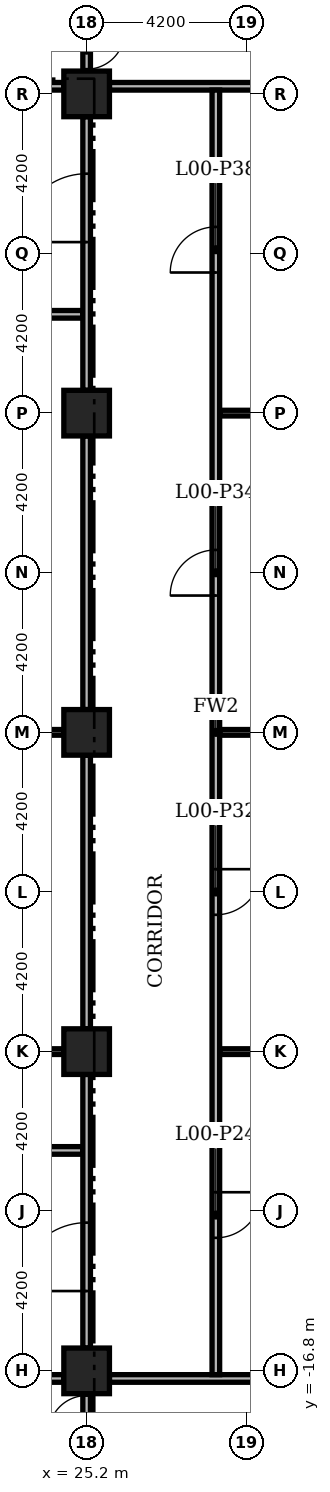
"""IFC4 building model, lengths in metres.
Left out: names, types, materials, properties, quantities, classifications, styles, units other than length and angle.
Written with IfcOpenShell. Run it as: python <this file> out.ifc"""

import sys

from ifc_helpers import new_model, si_unit, direction, frame, frame_2d, origin, origin_2d, place, context, subcontext, project, spatial, rectangle, extrude, element, fill, save


model = new_model("IFC4")
c1 = context("Model", 3, precision=1e-05, world=origin(), true_north=direction((0.0, 1.0)))
c2 = subcontext(c1, "Body", "Model", "MODEL_VIEW")
j1 = project(units=[si_unit("LENGTHUNIT", "METRE"), si_unit("PLANEANGLEUNIT", "RADIAN")], contexts=[c1])
p1 = place(None, origin())
s1 = spatial("IfcSite", under=j1, at=p1, CompositionType="ELEMENT")
p2 = place(p1, origin())
s2 = spatial("IfcBuilding", under=s1, at=p2, CompositionType="ELEMENT")
p3 = place(p2, origin())
s3 = spatial("IfcBuildingStorey", under=s2, at=p3, CompositionType="ELEMENT", Elevation=0.0)
for number, where, z_axis, x_axis in (
    (1, (25.2, 0.0, 0.0), (0.0, 0.0, 1.0), (1.0, 0.0, 0.0)),
    (2, (25.2, 8.4, 0.0), (0.0, 0.0, 1.0), (1.0, 0.0, 0.0)),
    (3, (25.2, 16.8, 0.0), (0.0, 0.0, 1.0), (1.0, 0.0, 0.0)),
    (4, (25.2, -8.4, 0.0), (0.0, 0.0, 1.0), (1.0, 0.0, 0.0)),
    (5, (25.2, -16.8, 0.0), (0.0, 0.0, 1.0), (1.0, 0.0, 0.0)),
):
    element("IfcColumn", number, at=place(p3, frame(where, z_axis=z_axis, x_axis=x_axis)), inside=s3, PredefinedType="COLUMN", context=c2, shape_type="SweptSolid", body=[
        extrude(rectangle(XDim=1.2, YDim=1.2, at=origin_2d()), origin(), (0.0, 0.0, 1.0), 7.2),
    ])
p4 = place(p3, frame((21.85, -17.0, 0.0), z_axis=(0.0, 0.0, 1.0), x_axis=(1.0, 0.0, 0.0)))
e6 = element("IfcWall", 6, at=p4, inside=s3, PredefinedType="PARTITIONING", context=c2, shape_type="SweptSolid", body=[
    extrude(rectangle(XDim=2.75, YDim=0.2, at=frame_2d((1.375, 0.0))), origin(), (0.0, 0.0, 1.0), 6.78),
])
p5 = place(p3, frame((25.8, -17.0, 0.0), z_axis=(0.0, 0.0, 1.0), x_axis=(1.0, 0.0, 0.0)))
e7 = element("IfcWall", 7, at=p5, inside=s3, PredefinedType="PARTITIONING", context=c2, shape_type="SweptSolid", body=[
    extrude(rectangle(XDim=7.2, YDim=0.2, at=frame_2d((3.6, 0.0))), origin(), (0.0, 0.0, 1.0), 6.48),
])
p6 = place(p3, frame((11.0, -11.0, 0.0), z_axis=(0.0, 0.0, 1.0), x_axis=(1.0, 0.0, 0.0)))
e8 = element("IfcWall", 8, at=p6, inside=s3, PredefinedType="PARTITIONING", context=c2, shape_type="SweptSolid", body=[
    extrude(rectangle(XDim=14.1, YDim=0.2, at=frame_2d((7.05, 0.0))), origin(), (0.0, 0.0, 1.0), 6.78),
])
p7 = place(p6, frame((6.5, 0.0, 0.0)))
e9 = element("IfcOpeningElement", 9, at=p7, cuts=e8, PredefinedType="OPENING", context=c2, shape_type="SweptSolid", body=[
    extrude(rectangle(XDim=1.2, YDim=2.2, at=frame_2d((0.6, 1.1))), frame((0.0, 0.11, 0.0), z_axis=(0.0, -1.0, 0.0), x_axis=(1.0, 0.0, 0.0)), (0.0, 0.0, 1.0), 0.22),
])
p8 = place(p3, frame((11.0, -8.4, 0.0), z_axis=(0.0, 0.0, 1.0), x_axis=(1.0, 0.0, 0.0)))
e10 = element("IfcWall", 10, at=p8, inside=s3, PredefinedType="PARTITIONING", context=c2, shape_type="SweptSolid", body=[
    extrude(rectangle(XDim=13.6, YDim=0.15, at=frame_2d((6.8, 0.0))), origin(), (0.0, 0.0, 1.0), 6.78),
])
p9 = place(p8, frame((0.5, 0.0, 0.0)))
e11 = element("IfcOpeningElement", 11, at=p9, cuts=e10, PredefinedType="OPENING", context=c2, shape_type="SweptSolid", body=[
    extrude(rectangle(XDim=1.0, YDim=2.1, at=frame_2d((0.5, 1.05))), frame((0.0, 0.085, 0.0), z_axis=(0.0, -1.0, 0.0), x_axis=(1.0, 0.0, 0.0)), (0.0, 0.0, 1.0), 0.17),
])
p10 = place(p8, frame((3.7, 0.0, 0.0)))
e12 = element("IfcOpeningElement", 12, at=p10, cuts=e10, PredefinedType="OPENING", context=c2, shape_type="SweptSolid", body=[
    extrude(rectangle(XDim=1.0, YDim=2.1, at=frame_2d((0.5, 1.05))), frame((0.0, 0.085, 0.0), z_axis=(0.0, -1.0, 0.0), x_axis=(1.0, 0.0, 0.0)), (0.0, 0.0, 1.0), 0.17),
])
p11 = place(p8, frame((8.1, 0.0, 0.0)))
e13 = element("IfcOpeningElement", 13, at=p11, cuts=e10, PredefinedType="OPENING", context=c2, shape_type="SweptSolid", body=[
    extrude(rectangle(XDim=1.0, YDim=2.1, at=frame_2d((0.5, 1.05))), frame((0.0, 0.085, 0.0), z_axis=(0.0, -1.0, 0.0), x_axis=(1.0, 0.0, 0.0)), (0.0, 0.0, 1.0), 0.17),
])
p12 = place(p8, frame((11.3, 0.0, 0.0)))
e14 = element("IfcOpeningElement", 14, at=p12, cuts=e10, PredefinedType="OPENING", context=c2, shape_type="SweptSolid", body=[
    extrude(rectangle(XDim=1.0, YDim=2.1, at=frame_2d((0.5, 1.05))), frame((0.0, 0.085, 0.0), z_axis=(0.0, -1.0, 0.0), x_axis=(1.0, 0.0, 0.0)), (0.0, 0.0, 1.0), 0.17),
])
p13 = place(p3, frame((28.7, -8.4, 0.0), z_axis=(0.0, 0.0, 1.0), x_axis=(1.0, 0.0, 0.0)))
e15 = element("IfcWall", 15, at=p13, inside=s3, PredefinedType="PARTITIONING", context=c2, shape_type="SweptSolid", body=[
    extrude(rectangle(XDim=4.3, YDim=0.15, at=frame_2d((2.15, 0.0))), origin(), (0.0, 0.0, 1.0), 6.48),
])
p14 = place(p3, frame((11.0, 0.0, 0.0), z_axis=(0.0, 0.0, 1.0), x_axis=(1.0, 0.0, 0.0)))
e16 = element("IfcWall", 16, at=p14, inside=s3, PredefinedType="PARTITIONING", context=c2, shape_type="SweptSolid", body=[
    extrude(rectangle(XDim=13.6, YDim=0.15, at=frame_2d((6.8, 0.0))), origin(), (0.0, 0.0, 1.0), 6.78),
])
for number, where, z_axis, x_axis in (
    (17, (28.7, 0.0, 0.0), (0.0, 0.0, 1.0), (1.0, 0.0, 0.0)),
    (18, (28.7, 8.4, 0.0), (0.0, 0.0, 1.0), (1.0, 0.0, 0.0)),
):
    element("IfcWall", number, at=place(p3, frame(where, z_axis=z_axis, x_axis=x_axis)), inside=s3, PredefinedType="PARTITIONING", context=c2, shape_type="SweptSolid", body=[
        extrude(rectangle(XDim=4.3, YDim=0.15, at=frame_2d((2.15, 0.0))), origin(), (0.0, 0.0, 1.0), 6.48),
    ])
p15 = place(p3, frame((11.0, 11.0, 0.0), z_axis=(0.0, 0.0, 1.0), x_axis=(1.0, 0.0, 0.0)))
e19 = element("IfcWall", 19, at=p15, inside=s3, PredefinedType="PARTITIONING", context=c2, shape_type="SweptSolid", body=[
    extrude(rectangle(XDim=14.1, YDim=0.2, at=frame_2d((7.05, 0.0))), origin(), (0.0, 0.0, 1.0), 6.78),
])
p16 = place(p15, frame((6.4, 0.0, 0.0)))
e20 = element("IfcOpeningElement", 20, at=p16, cuts=e19, PredefinedType="OPENING", context=c2, shape_type="SweptSolid", body=[
    extrude(rectangle(XDim=1.2, YDim=2.2, at=frame_2d((0.6, 1.1))), frame((0.0, 0.11, 0.0), z_axis=(0.0, -1.0, 0.0), x_axis=(1.0, 0.0, 0.0)), (0.0, 0.0, 1.0), 0.22),
])
p17 = place(p3, frame((21.85, 17.0, 0.0), z_axis=(0.0, 0.0, 1.0), x_axis=(1.0, 0.0, 0.0)))
e21 = element("IfcWall", 21, at=p17, inside=s3, PredefinedType="PARTITIONING", context=c2, shape_type="SweptSolid", body=[
    extrude(rectangle(XDim=2.75, YDim=0.2, at=frame_2d((1.375, 0.0))), origin(), (0.0, 0.0, 1.0), 6.78),
])
p18 = place(p3, frame((25.8, 17.0, 0.0), z_axis=(0.0, 0.0, 1.0), x_axis=(1.0, 0.0, 0.0)))
e22 = element("IfcWall", 22, at=p18, inside=s3, PredefinedType="PARTITIONING", context=c2, shape_type="SweptSolid", body=[
    extrude(rectangle(XDim=7.2, YDim=0.2, at=frame_2d((3.6, 0.0))), origin(), (0.0, 0.0, 1.0), 6.48),
])
p19 = place(p3, frame((25.2, -18.5, 0.0), z_axis=(0.0, 0.0, 1.0), x_axis=(0.0, 1.0, 0.0)))
e23 = element("IfcWall", 23, at=p19, inside=s3, PredefinedType="PARTITIONING", context=c2, shape_type="SweptSolid", body=[
    extrude(rectangle(XDim=1.1, YDim=0.2, at=frame_2d((0.55, 0.0))), origin(), (0.0, 0.0, 1.0), 6.38),
])
p20 = place(p19, frame((0.05, 0.0, 0.0)))
e24 = element("IfcOpeningElement", 24, at=p20, cuts=e23, PredefinedType="OPENING", context=c2, shape_type="SweptSolid", body=[
    extrude(rectangle(XDim=1.0, YDim=2.2, at=frame_2d((0.5, 1.1))), frame((0.0, 0.11, 0.0), z_axis=(0.0, -1.0, 0.0), x_axis=(1.0, 0.0, 0.0)), (0.0, 0.0, 1.0), 0.22),
])
p21 = place(p3, frame((25.2, -16.2, 0.0), z_axis=(0.0, 0.0, 1.0), x_axis=(0.0, 1.0, 0.0)))
e25 = element("IfcWall", 25, at=p21, inside=s3, PredefinedType="PARTITIONING", context=c2, shape_type="SweptSolid", body=[
    extrude(rectangle(XDim=7.2, YDim=0.2, at=frame_2d((3.6, 0.0))), origin(), (0.0, 0.0, 1.0), 6.48),
])
p22 = place(p21, frame((1.5, 0.0, 0.0)))
e26 = element("IfcOpeningElement", 26, at=p22, cuts=e25, PredefinedType="OPENING", context=c2, shape_type="SweptSolid", body=[
    extrude(rectangle(XDim=1.8, YDim=2.2, at=frame_2d((0.9, 1.1))), frame((0.0, 0.11, 0.0), z_axis=(0.0, -1.0, 0.0), x_axis=(1.0, 0.0, 0.0)), (0.0, 0.0, 1.0), 0.22),
])
for number, where, z_axis, x_axis in (
    (27, (25.2, -7.8, 0.0), (0.0, 0.0, 1.0), (0.0, 1.0, 0.0)),
    (28, (25.2, 0.6, 0.0), (0.0, 0.0, 1.0), (0.0, 1.0, 0.0)),
):
    element("IfcWall", number, at=place(p3, frame(where, z_axis=z_axis, x_axis=x_axis)), inside=s3, PredefinedType="PARTITIONING", context=c2, shape_type="SweptSolid", body=[
        extrude(rectangle(XDim=7.2, YDim=0.2, at=frame_2d((3.6, 0.0))), origin(), (0.0, 0.0, 1.0), 6.48),
    ])
p23 = place(p3, frame((25.2, 9.0, 0.0), z_axis=(0.0, 0.0, 1.0), x_axis=(0.0, 1.0, 0.0)))
e29 = element("IfcWall", 29, at=p23, inside=s3, PredefinedType="PARTITIONING", context=c2, shape_type="SweptSolid", body=[
    extrude(rectangle(XDim=7.2, YDim=0.2, at=frame_2d((3.6, 0.0))), origin(), (0.0, 0.0, 1.0), 6.48),
])
p24 = place(p23, frame((3.9, 0.0, 0.0)))
e30 = element("IfcOpeningElement", 30, at=p24, cuts=e29, PredefinedType="OPENING", context=c2, shape_type="SweptSolid", body=[
    extrude(rectangle(XDim=1.8, YDim=2.2, at=frame_2d((0.9, 1.1))), frame((0.0, 0.11, 0.0), z_axis=(0.0, -1.0, 0.0), x_axis=(1.0, 0.0, 0.0)), (0.0, 0.0, 1.0), 0.22),
])
p25 = place(p3, frame((25.2, 17.4, 0.0), z_axis=(0.0, 0.0, 1.0), x_axis=(0.0, 1.0, 0.0)))
e31 = element("IfcWall", 31, at=p25, inside=s3, PredefinedType="PARTITIONING", context=c2, shape_type="SweptSolid", body=[
    extrude(rectangle(XDim=1.1, YDim=0.2, at=frame_2d((0.55, 0.0))), origin(), (0.0, 0.0, 1.0), 6.38),
])
p26 = place(p25, frame((0.05, 0.0, 0.0)))
e32 = element("IfcOpeningElement", 32, at=p26, cuts=e31, PredefinedType="OPENING", context=c2, shape_type="SweptSolid", body=[
    extrude(rectangle(XDim=1.0, YDim=2.2, at=frame_2d((0.5, 1.1))), frame((0.0, 0.11, 0.0), z_axis=(0.0, -1.0, 0.0), x_axis=(1.0, 0.0, 0.0)), (0.0, 0.0, 1.0), 0.22),
])
p27 = place(p3, frame((28.6, -16.9, 0.0), z_axis=(0.0, 0.0, 1.0), x_axis=(0.0, 1.0, 0.0)))
e33 = element("IfcWall", 33, at=p27, inside=s3, PredefinedType="PARTITIONING", context=c2, shape_type="SweptSolid", body=[
    extrude(rectangle(XDim=33.8, YDim=0.2, at=frame_2d((16.9, 0.0))), origin(), (0.0, 0.0, 1.0), 6.48),
])
p28 = place(p27, frame((3.6, 0.0, 0.0)))
e34 = element("IfcOpeningElement", 34, at=p28, cuts=e33, PredefinedType="OPENING", context=c2, shape_type="SweptSolid", body=[
    extrude(rectangle(XDim=1.2, YDim=2.2, at=frame_2d((0.6, 1.1))), frame((0.0, 0.11, 0.0), z_axis=(0.0, -1.0, 0.0), x_axis=(1.0, 0.0, 0.0)), (0.0, 0.0, 1.0), 0.22),
])
p29 = place(p27, frame((12.1, 0.0, 0.0)))
e35 = element("IfcOpeningElement", 35, at=p29, cuts=e33, PredefinedType="OPENING", context=c2, shape_type="SweptSolid", body=[
    extrude(rectangle(XDim=1.2, YDim=2.2, at=frame_2d((0.6, 1.1))), frame((0.0, 0.11, 0.0), z_axis=(0.0, -1.0, 0.0), x_axis=(1.0, 0.0, 0.0)), (0.0, 0.0, 1.0), 0.22),
])
p30 = place(p27, frame((20.5, 0.0, 0.0)))
e36 = element("IfcOpeningElement", 36, at=p30, cuts=e33, PredefinedType="OPENING", context=c2, shape_type="SweptSolid", body=[
    extrude(rectangle(XDim=1.2, YDim=2.2, at=frame_2d((0.6, 1.1))), frame((0.0, 0.11, 0.0), z_axis=(0.0, -1.0, 0.0), x_axis=(1.0, 0.0, 0.0)), (0.0, 0.0, 1.0), 0.22),
])
p31 = place(p27, frame((29.0, 0.0, 0.0)))
e37 = element("IfcOpeningElement", 37, at=p31, cuts=e33, PredefinedType="OPENING", context=c2, shape_type="SweptSolid", body=[
    extrude(rectangle(XDim=1.2, YDim=2.2, at=frame_2d((0.6, 1.1))), frame((0.0, 0.11, 0.0), z_axis=(0.0, -1.0, 0.0), x_axis=(1.0, 0.0, 0.0)), (0.0, 0.0, 1.0), 0.22),
])
p32 = place(p20, origin())
e38 = element("IfcDoor", 38, at=p32, inside=s3, OperationType="SINGLE_SWING_LEFT", PredefinedType="DOOR", context=c2, shape_type="SweptSolid", body=[
    extrude(rectangle(XDim=1.0, YDim=2.2, at=frame_2d((0.5, 1.1))), frame((0.0, 0.025, 0.0), z_axis=(0.0, -1.0, 0.0), x_axis=(1.0, 0.0, 0.0)), (0.0, 0.0, 1.0), 0.05),
])
fill(e24, e38)
p33 = place(p22, origin())
e39 = element("IfcDoor", 39, at=p33, inside=s3, OperationType="DOUBLE_DOOR_SINGLE_SWING", PredefinedType="DOOR", context=c2, shape_type="SweptSolid", body=[
    extrude(rectangle(XDim=1.8, YDim=2.2, at=frame_2d((0.9, 1.1))), frame((0.0, 0.025, 0.0), z_axis=(0.0, -1.0, 0.0), x_axis=(1.0, 0.0, 0.0)), (0.0, 0.0, 1.0), 0.05),
])
fill(e26, e39)
p34 = place(p28, origin())
e40 = element("IfcDoor", 40, at=p34, inside=s3, OperationType="SINGLE_SWING_RIGHT", PredefinedType="DOOR", context=c2, shape_type="SweptSolid", body=[
    extrude(rectangle(XDim=1.2, YDim=2.2, at=frame_2d((0.6, 1.1))), frame((0.0, 0.025, 0.0), z_axis=(0.0, -1.0, 0.0), x_axis=(1.0, 0.0, 0.0)), (0.0, 0.0, 1.0), 0.05),
])
fill(e34, e40)
p35 = place(p29, origin())
e41 = element("IfcDoor", 41, at=p35, inside=s3, OperationType="SINGLE_SWING_RIGHT", PredefinedType="DOOR", context=c2, shape_type="SweptSolid", body=[
    extrude(rectangle(XDim=1.2, YDim=2.2, at=frame_2d((0.6, 1.1))), frame((0.0, 0.025, 0.0), z_axis=(0.0, -1.0, 0.0), x_axis=(1.0, 0.0, 0.0)), (0.0, 0.0, 1.0), 0.05),
])
fill(e35, e41)
p36 = place(p30, origin())
e42 = element("IfcDoor", 42, at=p36, inside=s3, OperationType="SINGLE_SWING_LEFT", PredefinedType="DOOR", context=c2, shape_type="SweptSolid", body=[
    extrude(rectangle(XDim=1.2, YDim=2.2, at=frame_2d((0.6, 1.1))), frame((0.0, 0.025, 0.0), z_axis=(0.0, -1.0, 0.0), x_axis=(1.0, 0.0, 0.0)), (0.0, 0.0, 1.0), 0.05),
])
fill(e36, e42)
p37 = place(p31, origin())
e43 = element("IfcDoor", 43, at=p37, inside=s3, OperationType="SINGLE_SWING_LEFT", PredefinedType="DOOR", context=c2, shape_type="SweptSolid", body=[
    extrude(rectangle(XDim=1.2, YDim=2.2, at=frame_2d((0.6, 1.1))), frame((0.0, 0.025, 0.0), z_axis=(0.0, -1.0, 0.0), x_axis=(1.0, 0.0, 0.0)), (0.0, 0.0, 1.0), 0.05),
])
fill(e37, e43)
p38 = place(p24, origin())
e44 = element("IfcDoor", 44, at=p38, inside=s3, OperationType="DOUBLE_DOOR_SINGLE_SWING", PredefinedType="DOOR", context=c2, shape_type="SweptSolid", body=[
    extrude(rectangle(XDim=1.8, YDim=2.2, at=frame_2d((0.9, 1.1))), frame((0.0, 0.025, 0.0), z_axis=(0.0, -1.0, 0.0), x_axis=(1.0, 0.0, 0.0)), (0.0, 0.0, 1.0), 0.05),
])
fill(e30, e44)
p39 = place(p26, origin())
e45 = element("IfcDoor", 45, at=p39, inside=s3, OperationType="SINGLE_SWING_RIGHT", PredefinedType="DOOR", context=c2, shape_type="SweptSolid", body=[
    extrude(rectangle(XDim=1.0, YDim=2.2, at=frame_2d((0.5, 1.1))), frame((0.0, 0.025, 0.0), z_axis=(0.0, -1.0, 0.0), x_axis=(1.0, 0.0, 0.0)), (0.0, 0.0, 1.0), 0.05),
])
fill(e32, e45)
save(model, sys.argv[1])
